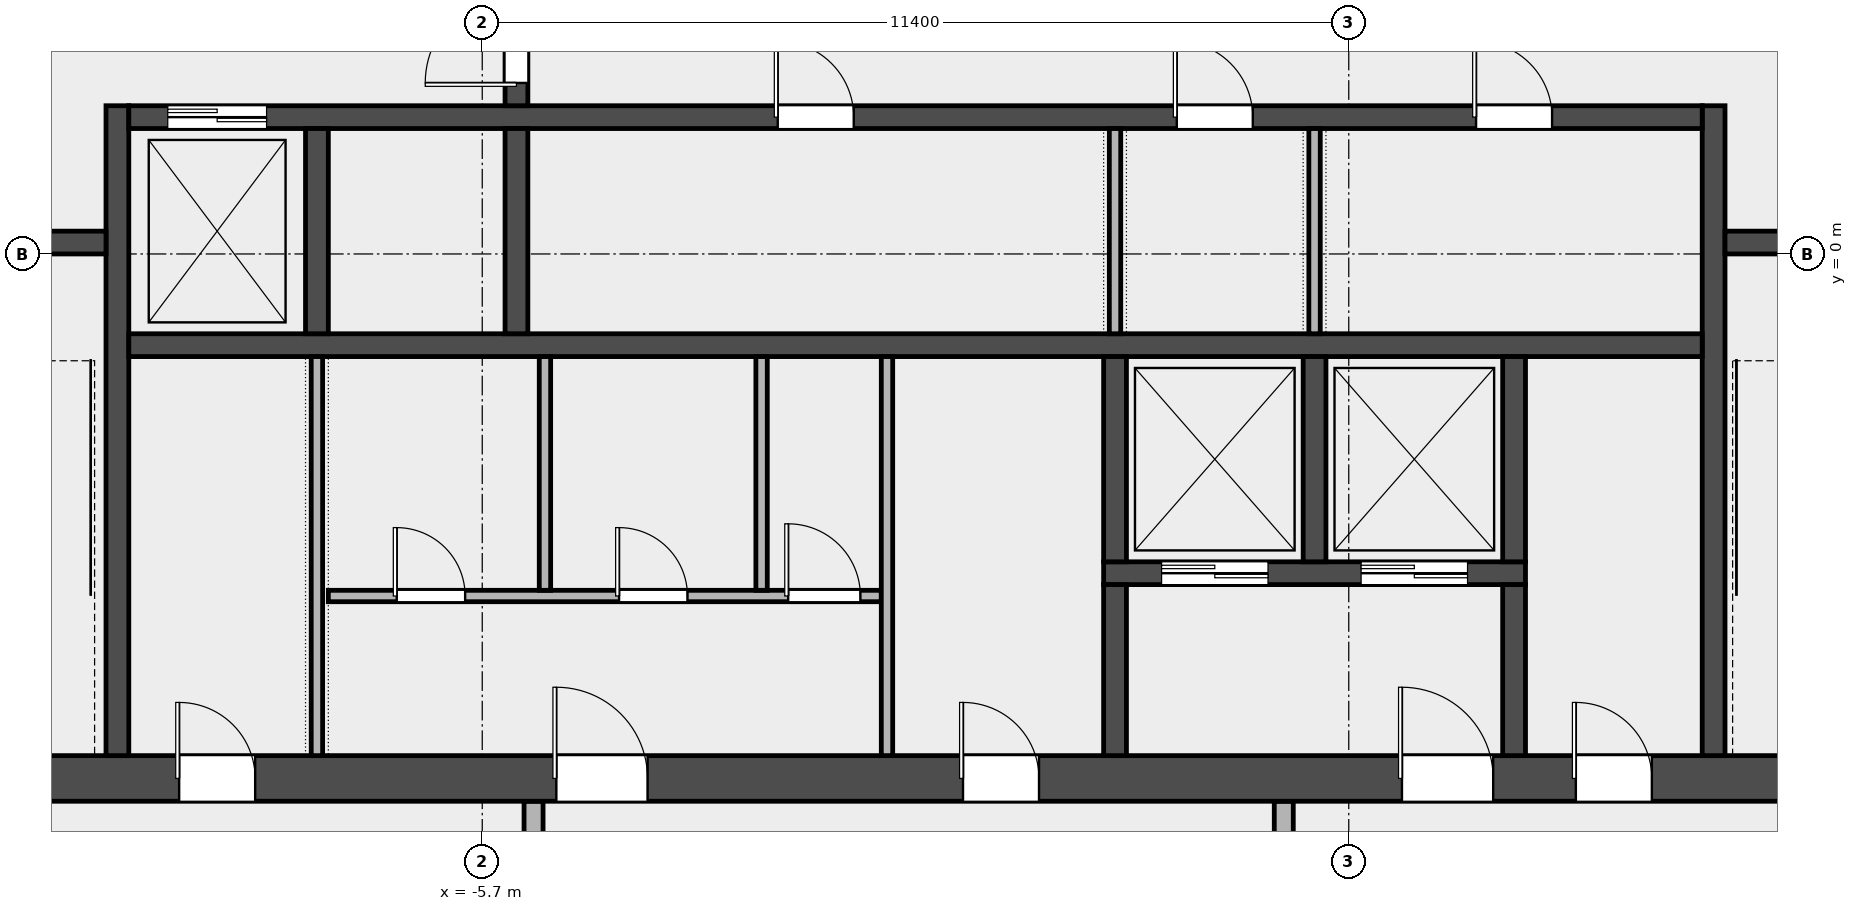
"""IFC4 building model, lengths in metres.
Left out: names, types, materials, properties, quantities, classifications, styles, units other than length and angle.
Written with IfcOpenShell. Run it as: python <this file> out.ifc"""

import sys

from ifc_helpers import new_model, si_unit, direction, frame, frame_2d, origin, place, context, subcontext, project, spatial, rectangle, extrude, element, fill, save


model = new_model("IFC4")
c1 = context("Model", 3, precision=1e-05, world=origin(), true_north=direction((0.0, 1.0)))
c2 = subcontext(c1, "Body", "Model", "MODEL_VIEW")
j1 = project(units=[si_unit("LENGTHUNIT", "METRE"), si_unit("PLANEANGLEUNIT", "RADIAN")], contexts=[c1])
p1 = place(None, origin())
s1 = spatial("IfcSite", under=j1, at=p1, CompositionType="ELEMENT")
p2 = place(p1, origin())
s2 = spatial("IfcBuilding", under=s1, at=p2, CompositionType="ELEMENT")
p3 = place(p2, frame((0.0, 0.0, 337.4)))
s3 = spatial("IfcBuildingStorey", under=s2, at=p3, CompositionType="ELEMENT", Elevation=337.4)
for number, where, z_axis, x_axis in (
    (1, (-5.025, -8.975, 0.0), (0.0, 0.0, 1.0), (0.0, 1.0, 0.0)),
    (2, (4.845, -8.975, 0.0), (0.0, 0.0, 1.0), (0.0, 1.0, 0.0)),
):
    element("IfcWall", number, at=place(p3, frame(where, z_axis=z_axis, x_axis=x_axis)), inside=s3, PredefinedType="PARTITIONING", context=c2, shape_type="SweptSolid", body=[
        extrude(rectangle(XDim=1.775, YDim=0.25, at=frame_2d((0.888, 0.0))), origin(), (0.0, 0.0, 1.0), 7.65),
    ])
p4 = place(p3, frame((-14.4, -6.9, 0.0), z_axis=(0.0, 0.0, 1.0), x_axis=(1.0, 0.0, 0.0)))
e3 = element("IfcWall", 3, at=p4, inside=s3, PredefinedType="SHEAR", context=c2, shape_type="SweptSolid", body=[
    extrude(rectangle(XDim=28.8, YDim=0.6, at=frame_2d((14.4, 0.0))), origin(), (0.0, 0.0, 1.0), 7.7),
])
p5 = place(p4, frame((4.712, 0.0, 0.0)))
e4 = element("IfcOpeningElement", 4, at=p5, cuts=e3, PredefinedType="OPENING", context=c2, shape_type="SweptSolid", body=[
    extrude(rectangle(XDim=1.0, YDim=2.1, at=frame_2d((0.5, 1.05))), frame((0.0, 0.312, 0.0), z_axis=(0.0, -1.0, 0.0), x_axis=(1.0, 0.0, 0.0)), (0.0, 0.0, 1.0), 0.624),
])
p6 = place(p4, frame((9.675, 0.0, 0.0)))
e5 = element("IfcOpeningElement", 5, at=p6, cuts=e3, PredefinedType="OPENING", context=c2, shape_type="SweptSolid", body=[
    extrude(rectangle(XDim=1.2, YDim=2.1, at=frame_2d((0.6, 1.05))), frame((0.0, 0.312, 0.0), z_axis=(0.0, -1.0, 0.0), x_axis=(1.0, 0.0, 0.0)), (0.0, 0.0, 1.0), 0.624),
])
p7 = place(p4, frame((15.025, 0.0, 0.0)))
e6 = element("IfcOpeningElement", 6, at=p7, cuts=e3, PredefinedType="OPENING", context=c2, shape_type="SweptSolid", body=[
    extrude(rectangle(XDim=1.0, YDim=2.1, at=frame_2d((0.5, 1.05))), frame((0.0, 0.312, 0.0), z_axis=(0.0, -1.0, 0.0), x_axis=(1.0, 0.0, 0.0)), (0.0, 0.0, 1.0), 0.624),
])
p8 = place(p4, frame((20.8, 0.0, 0.0)))
e7 = element("IfcOpeningElement", 7, at=p8, cuts=e3, PredefinedType="OPENING", context=c2, shape_type="SweptSolid", body=[
    extrude(rectangle(XDim=1.2, YDim=2.1, at=frame_2d((0.6, 1.05))), frame((0.0, 0.312, 0.0), z_axis=(0.0, -1.0, 0.0), x_axis=(1.0, 0.0, 0.0)), (0.0, 0.0, 1.0), 0.624),
])
p9 = place(p4, frame((23.087, 0.0, 0.0)))
e8 = element("IfcOpeningElement", 8, at=p9, cuts=e3, PredefinedType="OPENING", context=c2, shape_type="SweptSolid", body=[
    extrude(rectangle(XDim=1.0, YDim=2.1, at=frame_2d((0.5, 1.05))), frame((0.0, 0.312, 0.0), z_axis=(0.0, -1.0, 0.0), x_axis=(1.0, 0.0, 0.0)), (0.0, 0.0, 1.0), 0.624),
])
for number, where, z_axis, x_axis in (
    (9, (-10.5, -6.6, 0.0), (0.0, 0.0, 1.0), (0.0, 1.0, 0.0)),
    (10, (10.5, -6.6, 0.0), (0.0, 0.0, 1.0), (0.0, 1.0, 0.0)),
):
    element("IfcWall", number, at=place(p3, frame(where, z_axis=z_axis, x_axis=x_axis)), inside=s3, PredefinedType="SHEAR", context=c2, shape_type="SweptSolid", body=[
        extrude(rectangle(XDim=8.55, YDim=0.3, at=frame_2d((4.275, 0.0))), origin(), (0.0, 0.0, 1.0), 7.7),
    ])
p10 = place(p3, frame((-13.8, 0.15, 0.0), z_axis=(0.0, 0.0, 1.0), x_axis=(1.0, 0.0, 0.0)))
e11 = element("IfcWall", 11, at=p10, inside=s3, PredefinedType="SOLIDWALL", context=c2, shape_type="SweptSolid", body=[
    extrude(rectangle(XDim=3.15, YDim=0.3, at=frame_2d((1.575, 0.0))), origin(), (0.0, 0.0, 1.0), 7.7),
])
p11 = place(p10, frame((0.975, 0.0, 0.0)))
e12 = element("IfcOpeningElement", 12, at=p11, cuts=e11, PredefinedType="OPENING", context=c2, shape_type="SweptSolid", body=[
    extrude(rectangle(XDim=1.1, YDim=2.1, at=frame_2d((0.55, 1.05))), frame((0.0, 0.162, 0.0), z_axis=(0.0, -1.0, 0.0), x_axis=(1.0, 0.0, 0.0)), (0.0, 0.0, 1.0), 0.324),
])
p12 = place(p3, frame((10.65, 0.15, 0.0), z_axis=(0.0, 0.0, 1.0), x_axis=(1.0, 0.0, 0.0)))
e13 = element("IfcWall", 13, at=p12, inside=s3, PredefinedType="SOLIDWALL", context=c2, shape_type="SweptSolid", body=[
    extrude(rectangle(XDim=3.15, YDim=0.3, at=frame_2d((1.575, 0.0))), origin(), (0.0, 0.0, 1.0), 7.7),
])
p13 = place(p12, frame((1.025, 0.0, 0.0)))
e14 = element("IfcOpeningElement", 14, at=p13, cuts=e13, PredefinedType="OPENING", context=c2, shape_type="SweptSolid", body=[
    extrude(rectangle(XDim=1.1, YDim=2.1, at=frame_2d((0.55, 1.05))), frame((0.0, 0.162, 0.0), z_axis=(0.0, -1.0, 0.0), x_axis=(1.0, 0.0, 0.0)), (0.0, 0.0, 1.0), 0.324),
])
p14 = place(p3, frame((-10.35, -1.2, 0.0), z_axis=(0.0, 0.0, 1.0), x_axis=(1.0, 0.0, 0.0)))
e15 = element("IfcWall", 15, at=p14, inside=s3, PredefinedType="SOLIDWALL", context=c2, shape_type="SweptSolid", body=[
    extrude(rectangle(XDim=20.7, YDim=0.3, at=frame_2d((10.35, 0.0))), origin(), (0.0, 0.0, 1.0), 7.7),
])
p15 = place(p3, frame((-10.35, 1.8, 0.0), z_axis=(0.0, 0.0, 1.0), x_axis=(1.0, 0.0, 0.0)))
e16 = element("IfcWall", 16, at=p15, inside=s3, PredefinedType="SOLIDWALL", context=c2, shape_type="SweptSolid", body=[
    extrude(rectangle(XDim=20.7, YDim=0.3, at=frame_2d((10.35, 0.0))), origin(), (0.0, 0.0, 1.0), 7.7),
])
p16 = place(p15, frame((0.512, 0.0, 0.0)))
e17 = element("IfcOpeningElement", 17, at=p16, cuts=e16, PredefinedType="OPENING", context=c2, shape_type="SweptSolid", body=[
    extrude(rectangle(XDim=1.3, YDim=2.1, at=frame_2d((0.65, 1.05))), frame((0.0, 0.162, 0.0), z_axis=(0.0, -1.0, 0.0), x_axis=(1.0, 0.0, 0.0)), (0.0, 0.0, 1.0), 0.324),
])
p17 = place(p15, frame((8.538, 0.0, 0.0)))
e18 = element("IfcOpeningElement", 18, at=p17, cuts=e16, PredefinedType="OPENING", context=c2, shape_type="SweptSolid", body=[
    extrude(rectangle(XDim=1.0, YDim=2.1, at=frame_2d((0.5, 1.05))), frame((0.0, 0.162, 0.0), z_axis=(0.0, -1.0, 0.0), x_axis=(1.0, 0.0, 0.0)), (0.0, 0.0, 1.0), 0.324),
])
p18 = place(p15, frame((13.788, 0.0, 0.0)))
e19 = element("IfcOpeningElement", 19, at=p18, cuts=e16, PredefinedType="OPENING", context=c2, shape_type="SweptSolid", body=[
    extrude(rectangle(XDim=1.0, YDim=2.1, at=frame_2d((0.5, 1.05))), frame((0.0, 0.162, 0.0), z_axis=(0.0, -1.0, 0.0), x_axis=(1.0, 0.0, 0.0)), (0.0, 0.0, 1.0), 0.324),
])
p19 = place(p15, frame((17.725, 0.0, 0.0)))
e20 = element("IfcOpeningElement", 20, at=p19, cuts=e16, PredefinedType="OPENING", context=c2, shape_type="SweptSolid", body=[
    extrude(rectangle(XDim=1.0, YDim=2.1, at=frame_2d((0.5, 1.05))), frame((0.0, 0.162, 0.0), z_axis=(0.0, -1.0, 0.0), x_axis=(1.0, 0.0, 0.0)), (0.0, 0.0, 1.0), 0.324),
])
for number, where, z_axis, x_axis in (
    (21, (-7.875, -1.05, 0.0), (0.0, 0.0, 1.0), (0.0, 1.0, 0.0)),
    (22, (-5.25, -1.05, 0.0), (0.0, 0.0, 1.0), (0.0, 1.0, 0.0)),
):
    element("IfcWall", number, at=place(p3, frame(where, z_axis=z_axis, x_axis=x_axis)), inside=s3, PredefinedType="SOLIDWALL", context=c2, shape_type="SweptSolid", body=[
        extrude(rectangle(XDim=2.7, YDim=0.3, at=frame_2d((1.35, 0.0))), origin(), (0.0, 0.0, 1.0), 7.7),
    ])
p20 = place(p3, frame((-5.25, 1.95, 0.0), z_axis=(0.0, 0.0, 1.0), x_axis=(0.0, 1.0, 0.0)))
e23 = element("IfcWall", 23, at=p20, inside=s3, PredefinedType="SOLIDWALL", context=c2, shape_type="SweptSolid", body=[
    extrude(rectangle(XDim=3.3, YDim=0.3, at=frame_2d((1.65, 0.0))), origin(), (0.0, 0.0, 1.0), 7.7),
])
p21 = place(p20, frame((0.3, 0.0, 0.0)))
e24 = element("IfcOpeningElement", 24, at=p21, cuts=e23, PredefinedType="OPENING", context=c2, shape_type="SweptSolid", body=[
    extrude(rectangle(XDim=1.2, YDim=2.1, at=frame_2d((0.6, 1.05))), frame((0.0, 0.162, 0.0), z_axis=(0.0, -1.0, 0.0), x_axis=(1.0, 0.0, 0.0)), (0.0, 0.0, 1.0), 0.324),
])
p22 = place(p20, frame((1.8, 0.0, 0.0)))
e25 = element("IfcOpeningElement", 25, at=p22, cuts=e23, PredefinedType="OPENING", context=c2, shape_type="SweptSolid", body=[
    extrude(rectangle(XDim=1.2, YDim=2.1, at=frame_2d((0.6, 1.05))), frame((0.0, 0.162, 0.0), z_axis=(0.0, -1.0, 0.0), x_axis=(1.0, 0.0, 0.0)), (0.0, 0.0, 1.0), 0.324),
])
p23 = place(p3, frame((2.475, -4.2, 0.0), z_axis=(0.0, 0.0, 1.0), x_axis=(1.0, 0.0, 0.0)))
e26 = element("IfcWall", 26, at=p23, inside=s3, PredefinedType="SOLIDWALL", context=c2, shape_type="SweptSolid", body=[
    extrude(rectangle(XDim=5.55, YDim=0.3, at=frame_2d((2.775, 0.0))), origin(), (0.0, 0.0, 1.0), 7.7),
])
p24 = place(p23, frame((0.762, 0.0, 0.0)))
e27 = element("IfcOpeningElement", 27, at=p24, cuts=e26, PredefinedType="OPENING", context=c2, shape_type="SweptSolid", body=[
    extrude(rectangle(XDim=1.4, YDim=2.1, at=frame_2d((0.7, 1.05))), frame((0.0, 0.162, 0.0), z_axis=(0.0, -1.0, 0.0), x_axis=(1.0, 0.0, 0.0)), (0.0, 0.0, 1.0), 0.324),
])
p25 = place(p23, frame((3.387, 0.0, 0.0)))
e28 = element("IfcOpeningElement", 28, at=p25, cuts=e26, PredefinedType="OPENING", context=c2, shape_type="SweptSolid", body=[
    extrude(rectangle(XDim=1.4, YDim=2.1, at=frame_2d((0.7, 1.05))), frame((0.0, 0.162, 0.0), z_axis=(0.0, -1.0, 0.0), x_axis=(1.0, 0.0, 0.0)), (0.0, 0.0, 1.0), 0.324),
])
p26 = place(p3, frame((2.625, -4.05, 0.0), z_axis=(0.0, 0.0, 1.0), x_axis=(0.0, 1.0, 0.0)))
e29 = element("IfcWall", 29, at=p26, inside=s3, PredefinedType="SOLIDWALL", context=c2, shape_type="SweptSolid", body=[
    extrude(rectangle(XDim=2.7, YDim=0.3, at=frame_2d((1.35, 0.0))), origin(), (0.0, 0.0, 1.0), 7.7),
])
p27 = place(p3, frame((2.625, -6.6, 0.0), z_axis=(0.0, 0.0, 1.0), x_axis=(0.0, 1.0, 0.0)))
e30 = element("IfcWall", 30, at=p27, inside=s3, PredefinedType="SOLIDWALL", context=c2, shape_type="SweptSolid", body=[
    extrude(rectangle(XDim=2.25, YDim=0.3, at=frame_2d((1.125, 0.0))), origin(), (0.0, 0.0, 1.0), 7.7),
])
for number, where, z_axis, x_axis in (
    (31, (5.25, -4.05, 0.0), (0.0, 0.0, 1.0), (0.0, 1.0, 0.0)),
    (32, (7.875, -4.05, 0.0), (0.0, 0.0, 1.0), (0.0, 1.0, 0.0)),
):
    element("IfcWall", number, at=place(p3, frame(where, z_axis=z_axis, x_axis=x_axis)), inside=s3, PredefinedType="SOLIDWALL", context=c2, shape_type="SweptSolid", body=[
        extrude(rectangle(XDim=2.7, YDim=0.3, at=frame_2d((1.35, 0.0))), origin(), (0.0, 0.0, 1.0), 7.7),
    ])
p28 = place(p3, frame((7.875, -6.6, 0.0), z_axis=(0.0, 0.0, 1.0), x_axis=(0.0, 1.0, 0.0)))
e33 = element("IfcWall", 33, at=p28, inside=s3, PredefinedType="SOLIDWALL", context=c2, shape_type="SweptSolid", body=[
    extrude(rectangle(XDim=2.25, YDim=0.3, at=frame_2d((1.125, 0.0))), origin(), (0.0, 0.0, 1.0), 7.7),
])
p29 = place(p3, frame((-7.875, -6.6, 0.0), z_axis=(0.0, 0.0, 1.0), x_axis=(0.0, 1.0, 0.0)))
e34 = element("IfcWall", 34, at=p29, inside=s3, PredefinedType="PARTITIONING", context=c2, shape_type="SweptSolid", body=[
    extrude(rectangle(XDim=5.25, YDim=0.15, at=frame_2d((2.625, 0.0))), origin(), (0.0, 0.0, 1.0), 7.7),
])
p30 = place(p3, frame((-7.725, -4.5, 0.0), z_axis=(0.0, 0.0, 1.0), x_axis=(1.0, 0.0, 0.0)))
e35 = element("IfcWall", 35, at=p30, inside=s3, PredefinedType="PARTITIONING", context=c2, shape_type="SweptSolid", body=[
    extrude(rectangle(XDim=7.275, YDim=0.15, at=frame_2d((3.638, 0.0))), origin(), (0.0, 0.0, 1.0), 7.7),
])
p31 = place(p30, frame((0.9, 0.0, 0.0)))
e36 = element("IfcOpeningElement", 36, at=p31, cuts=e35, PredefinedType="OPENING", context=c2, shape_type="SweptSolid", body=[
    extrude(rectangle(XDim=0.9, YDim=2.1, at=frame_2d((0.45, 1.05))), frame((0.0, 0.087, 0.0), z_axis=(0.0, -1.0, 0.0), x_axis=(1.0, 0.0, 0.0)), (0.0, 0.0, 1.0), 0.174),
])
p32 = place(p30, frame((3.825, 0.0, 0.0)))
e37 = element("IfcOpeningElement", 37, at=p32, cuts=e35, PredefinedType="OPENING", context=c2, shape_type="SweptSolid", body=[
    extrude(rectangle(XDim=0.9, YDim=2.1, at=frame_2d((0.45, 1.05))), frame((0.0, 0.087, 0.0), z_axis=(0.0, -1.0, 0.0), x_axis=(1.0, 0.0, 0.0)), (0.0, 0.0, 1.0), 0.174),
])
p33 = place(p30, frame((6.05, 0.0, 0.0)))
e38 = element("IfcOpeningElement", 38, at=p33, cuts=e35, PredefinedType="OPENING", context=c2, shape_type="SweptSolid", body=[
    extrude(rectangle(XDim=0.95, YDim=2.1, at=frame_2d((0.475, 1.05))), frame((0.0, 0.087, 0.0), z_axis=(0.0, -1.0, 0.0), x_axis=(1.0, 0.0, 0.0)), (0.0, 0.0, 1.0), 0.174),
])
for number, where, z_axis, x_axis in (
    (39, (-4.875, -4.425, 0.0), (0.0, 0.0, 1.0), (0.0, 1.0, 0.0)),
    (40, (-2.025, -4.425, 0.0), (0.0, 0.0, 1.0), (0.0, 1.0, 0.0)),
):
    element("IfcWall", number, at=place(p3, frame(where, z_axis=z_axis, x_axis=x_axis)), inside=s3, PredefinedType="PARTITIONING", context=c2, shape_type="SweptSolid", body=[
        extrude(rectangle(XDim=3.075, YDim=0.15, at=frame_2d((1.538, 0.0))), origin(), (0.0, 0.0, 1.0), 7.7),
    ])
p34 = place(p3, frame((-0.375, -6.6, 0.0), z_axis=(0.0, 0.0, 1.0), x_axis=(0.0, 1.0, 0.0)))
e41 = element("IfcWall", 41, at=p34, inside=s3, PredefinedType="PARTITIONING", context=c2, shape_type="SweptSolid", body=[
    extrude(rectangle(XDim=5.25, YDim=0.15, at=frame_2d((2.625, 0.0))), origin(), (0.0, 0.0, 1.0), 7.7),
])
for number, where, z_axis, x_axis in (
    (42, (2.625, -1.05, 0.0), (0.0, 0.0, 1.0), (0.0, 1.0, 0.0)),
    (43, (5.25, -1.05, 0.0), (0.0, 0.0, 1.0), (0.0, 1.0, 0.0)),
):
    element("IfcWall", number, at=place(p3, frame(where, z_axis=z_axis, x_axis=x_axis)), inside=s3, PredefinedType="PARTITIONING", context=c2, shape_type="SweptSolid", body=[
        extrude(rectangle(XDim=2.7, YDim=0.15, at=frame_2d((1.35, 0.0))), origin(), (0.0, 0.0, 1.0), 7.7),
    ])
p35 = place(p21, origin())
e44 = element("IfcDoor", 44, at=p35, inside=s3, OperationType="SINGLE_SWING_LEFT", PredefinedType="DOOR", context=c2, shape_type="SweptSolid", body=[
    extrude(rectangle(XDim=1.2, YDim=2.1, at=frame_2d((0.6, 1.05))), frame((0.0, 0.025, 0.0), z_axis=(0.0, -1.0, 0.0), x_axis=(1.0, 0.0, 0.0)), (0.0, 0.0, 1.0), 0.05),
])
fill(e24, e44)
p36 = place(p16, origin())
e45 = element("IfcDoor", 45, at=p36, inside=s3, OperationType="DOUBLE_DOOR_SLIDING", PredefinedType="DOOR", context=c2, shape_type="SweptSolid", body=[
    extrude(rectangle(XDim=1.3, YDim=2.1, at=frame_2d((0.65, 1.05))), frame((0.0, 0.025, 0.0), z_axis=(0.0, -1.0, 0.0), x_axis=(1.0, 0.0, 0.0)), (0.0, 0.0, 1.0), 0.05),
])
fill(e17, e45)
p37 = place(p24, origin())
e46 = element("IfcDoor", 46, at=p37, inside=s3, OperationType="DOUBLE_DOOR_SLIDING", PredefinedType="DOOR", context=c2, shape_type="SweptSolid", body=[
    extrude(rectangle(XDim=1.4, YDim=2.1, at=frame_2d((0.7, 1.05))), frame((0.0, 0.025, 0.0), z_axis=(0.0, -1.0, 0.0), x_axis=(1.0, 0.0, 0.0)), (0.0, 0.0, 1.0), 0.05),
])
fill(e27, e46)
p38 = place(p25, origin())
e47 = element("IfcDoor", 47, at=p38, inside=s3, OperationType="DOUBLE_DOOR_SLIDING", PredefinedType="DOOR", context=c2, shape_type="SweptSolid", body=[
    extrude(rectangle(XDim=1.4, YDim=2.1, at=frame_2d((0.7, 1.05))), frame((0.0, 0.025, 0.0), z_axis=(0.0, -1.0, 0.0), x_axis=(1.0, 0.0, 0.0)), (0.0, 0.0, 1.0), 0.05),
])
fill(e28, e47)
p39 = place(p5, origin())
e48 = element("IfcDoor", 48, at=p39, inside=s3, OperationType="SINGLE_SWING_LEFT", PredefinedType="DOOR", context=c2, shape_type="SweptSolid", body=[
    extrude(rectangle(XDim=1.0, YDim=2.1, at=frame_2d((0.5, 1.05))), frame((0.0, 0.025, 0.0), z_axis=(0.0, -1.0, 0.0), x_axis=(1.0, 0.0, 0.0)), (0.0, 0.0, 1.0), 0.05),
])
fill(e4, e48)
p40 = place(p6, origin())
e49 = element("IfcDoor", 49, at=p40, inside=s3, OperationType="SINGLE_SWING_LEFT", PredefinedType="DOOR", context=c2, shape_type="SweptSolid", body=[
    extrude(rectangle(XDim=1.2, YDim=2.1, at=frame_2d((0.6, 1.05))), frame((0.0, 0.025, 0.0), z_axis=(0.0, -1.0, 0.0), x_axis=(1.0, 0.0, 0.0)), (0.0, 0.0, 1.0), 0.05),
])
fill(e5, e49)
p41 = place(p31, origin())
e50 = element("IfcDoor", 50, at=p41, inside=s3, OperationType="SINGLE_SWING_LEFT", PredefinedType="DOOR", context=c2, shape_type="SweptSolid", body=[
    extrude(rectangle(XDim=0.9, YDim=2.1, at=frame_2d((0.45, 1.05))), frame((0.0, 0.025, 0.0), z_axis=(0.0, -1.0, 0.0), x_axis=(1.0, 0.0, 0.0)), (0.0, 0.0, 1.0), 0.05),
])
fill(e36, e50)
p42 = place(p32, origin())
e51 = element("IfcDoor", 51, at=p42, inside=s3, OperationType="SINGLE_SWING_LEFT", PredefinedType="DOOR", context=c2, shape_type="SweptSolid", body=[
    extrude(rectangle(XDim=0.9, YDim=2.1, at=frame_2d((0.45, 1.05))), frame((0.0, 0.025, 0.0), z_axis=(0.0, -1.0, 0.0), x_axis=(1.0, 0.0, 0.0)), (0.0, 0.0, 1.0), 0.05),
])
fill(e37, e51)
p43 = place(p33, origin())
e52 = element("IfcDoor", 52, at=p43, inside=s3, OperationType="SINGLE_SWING_LEFT", PredefinedType="DOOR", context=c2, shape_type="SweptSolid", body=[
    extrude(rectangle(XDim=0.95, YDim=2.1, at=frame_2d((0.475, 1.05))), frame((0.0, 0.025, 0.0), z_axis=(0.0, -1.0, 0.0), x_axis=(1.0, 0.0, 0.0)), (0.0, 0.0, 1.0), 0.05),
])
fill(e38, e52)
p44 = place(p7, origin())
e53 = element("IfcDoor", 53, at=p44, inside=s3, OperationType="SINGLE_SWING_LEFT", PredefinedType="DOOR", context=c2, shape_type="SweptSolid", body=[
    extrude(rectangle(XDim=1.0, YDim=2.1, at=frame_2d((0.5, 1.05))), frame((0.0, 0.025, 0.0), z_axis=(0.0, -1.0, 0.0), x_axis=(1.0, 0.0, 0.0)), (0.0, 0.0, 1.0), 0.05),
])
fill(e6, e53)
p45 = place(p8, origin())
e54 = element("IfcDoor", 54, at=p45, inside=s3, OperationType="SINGLE_SWING_LEFT", PredefinedType="DOOR", context=c2, shape_type="SweptSolid", body=[
    extrude(rectangle(XDim=1.2, YDim=2.1, at=frame_2d((0.6, 1.05))), frame((0.0, 0.025, 0.0), z_axis=(0.0, -1.0, 0.0), x_axis=(1.0, 0.0, 0.0)), (0.0, 0.0, 1.0), 0.05),
])
fill(e7, e54)
p46 = place(p9, origin())
e55 = element("IfcDoor", 55, at=p46, inside=s3, OperationType="SINGLE_SWING_LEFT", PredefinedType="DOOR", context=c2, shape_type="SweptSolid", body=[
    extrude(rectangle(XDim=1.0, YDim=2.1, at=frame_2d((0.5, 1.05))), frame((0.0, 0.025, 0.0), z_axis=(0.0, -1.0, 0.0), x_axis=(1.0, 0.0, 0.0)), (0.0, 0.0, 1.0), 0.05),
])
fill(e8, e55)
p47 = place(p17, origin())
e56 = element("IfcDoor", 56, at=p47, inside=s3, OperationType="SINGLE_SWING_LEFT", PredefinedType="DOOR", context=c2, shape_type="SweptSolid", body=[
    extrude(rectangle(XDim=1.0, YDim=2.1, at=frame_2d((0.5, 1.05))), frame((0.0, 0.025, 0.0), z_axis=(0.0, -1.0, 0.0), x_axis=(1.0, 0.0, 0.0)), (0.0, 0.0, 1.0), 0.05),
])
fill(e18, e56)
p48 = place(p18, origin())
e57 = element("IfcDoor", 57, at=p48, inside=s3, OperationType="SINGLE_SWING_LEFT", PredefinedType="DOOR", context=c2, shape_type="SweptSolid", body=[
    extrude(rectangle(XDim=1.0, YDim=2.1, at=frame_2d((0.5, 1.05))), frame((0.0, 0.025, 0.0), z_axis=(0.0, -1.0, 0.0), x_axis=(1.0, 0.0, 0.0)), (0.0, 0.0, 1.0), 0.05),
])
fill(e19, e57)
p49 = place(p19, origin())
e58 = element("IfcDoor", 58, at=p49, inside=s3, OperationType="SINGLE_SWING_LEFT", PredefinedType="DOOR", context=c2, shape_type="SweptSolid", body=[
    extrude(rectangle(XDim=1.0, YDim=2.1, at=frame_2d((0.5, 1.05))), frame((0.0, 0.025, 0.0), z_axis=(0.0, -1.0, 0.0), x_axis=(1.0, 0.0, 0.0)), (0.0, 0.0, 1.0), 0.05),
])
fill(e20, e58)
save(model, sys.argv[1])
